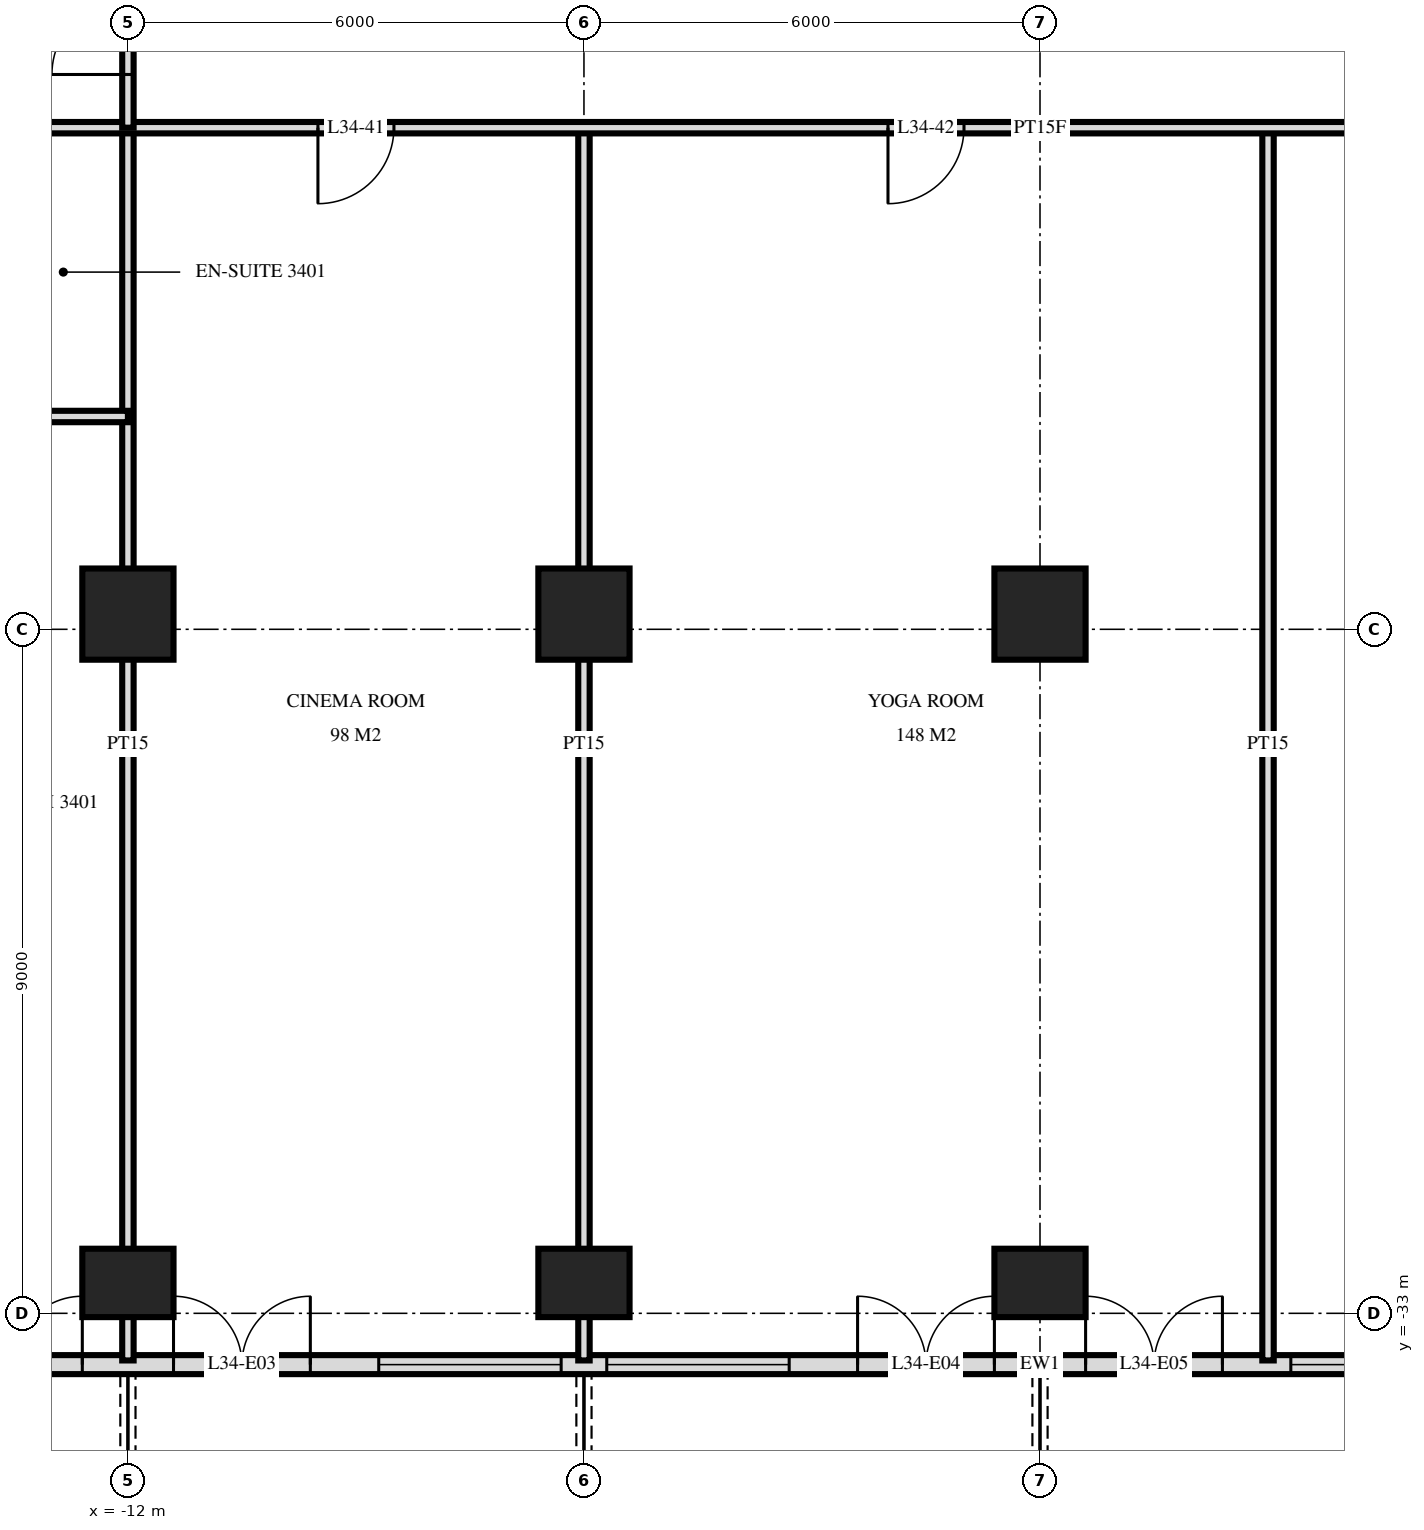
"""IFC4 building model, lengths in metres.
Left out: names, types, materials, properties, quantities, classifications, styles, units other than length and angle.
Written with IfcOpenShell. Run it as: python <this file> out.ifc"""

import sys

from ifc_helpers import new_model, si_unit, direction, frame, frame_2d, origin, origin_2d, place, context, subcontext, project, spatial, rectangle, extrude, element, fill, save


model = new_model("IFC4")
c1 = context("Model", 3, precision=1e-05, world=origin(), true_north=direction((0.0, 1.0)))
c2 = subcontext(c1, "Body", "Model", "MODEL_VIEW")
j1 = project(units=[si_unit("LENGTHUNIT", "METRE"), si_unit("PLANEANGLEUNIT", "RADIAN")], contexts=[c1])
p1 = place(None, origin())
s1 = spatial("IfcSite", under=j1, at=p1, CompositionType="ELEMENT")
p2 = place(p1, origin())
s2 = spatial("IfcBuilding", under=s1, at=p2, CompositionType="ELEMENT")
p3 = place(p2, frame((0.0, 0.0, 134.4)))
s3 = spatial("IfcBuildingStorey", under=s2, at=p3, CompositionType="ELEMENT", Elevation=134.4)
p4 = place(p3, frame((-12.0, -32.6, 0.0), z_axis=(0.0, 0.0, 1.0), x_axis=(1.0, 0.0, 0.0)))
e1 = element("IfcColumn", 1, at=p4, inside=s3, PredefinedType="COLUMN", context=c2, shape_type="SweptSolid", body=[
    extrude(rectangle(XDim=1.2, YDim=0.9, at=origin_2d()), origin(), (0.0, 0.0, 1.0), 3.6),
])
p5 = place(p3, frame((-12.0, -23.8, 0.0), z_axis=(0.0, 0.0, 1.0), x_axis=(1.0, 0.0, 0.0)))
e2 = element("IfcColumn", 2, at=p5, inside=s3, PredefinedType="COLUMN", context=c2, shape_type="SweptSolid", body=[
    extrude(rectangle(XDim=1.2, YDim=1.2, at=origin_2d()), origin(), (0.0, 0.0, 1.0), 3.6),
])
p6 = place(p3, frame((-6.0, -32.6, 0.0), z_axis=(0.0, 0.0, 1.0), x_axis=(1.0, 0.0, 0.0)))
e3 = element("IfcColumn", 3, at=p6, inside=s3, PredefinedType="COLUMN", context=c2, shape_type="SweptSolid", body=[
    extrude(rectangle(XDim=1.2, YDim=0.9, at=origin_2d()), origin(), (0.0, 0.0, 1.0), 3.6),
])
p7 = place(p3, frame((-6.0, -23.8, 0.0), z_axis=(0.0, 0.0, 1.0), x_axis=(1.0, 0.0, 0.0)))
e4 = element("IfcColumn", 4, at=p7, inside=s3, PredefinedType="COLUMN", context=c2, shape_type="SweptSolid", body=[
    extrude(rectangle(XDim=1.2, YDim=1.2, at=origin_2d()), origin(), (0.0, 0.0, 1.0), 3.6),
])
p8 = place(p3, frame((0.0, -32.6, 0.0), z_axis=(0.0, 0.0, 1.0), x_axis=(1.0, 0.0, 0.0)))
e5 = element("IfcColumn", 5, at=p8, inside=s3, PredefinedType="COLUMN", context=c2, shape_type="SweptSolid", body=[
    extrude(rectangle(XDim=1.2, YDim=0.9, at=origin_2d()), origin(), (0.0, 0.0, 1.0), 3.6),
])
p9 = place(p3, frame((0.0, -23.8, 0.0), z_axis=(0.0, 0.0, 1.0), x_axis=(1.0, 0.0, 0.0)))
e6 = element("IfcColumn", 6, at=p9, inside=s3, PredefinedType="COLUMN", context=c2, shape_type="SweptSolid", body=[
    extrude(rectangle(XDim=1.2, YDim=1.2, at=origin_2d()), origin(), (0.0, 0.0, 1.0), 3.6),
])
p10 = place(p3, frame((-23.675, -33.675, 0.0), z_axis=(0.0, 0.0, 1.0), x_axis=(1.0, 0.0, 0.0)))
e7 = element("IfcWall", 7, at=p10, inside=s3, PredefinedType="SOLIDWALL", context=c2, shape_type="SweptSolid", body=[
    extrude(rectangle(XDim=47.351, YDim=0.25, at=frame_2d((23.675, 0.0))), origin(), (0.0, 0.0, 1.0), 3.32),
])
p11 = place(p10, frame((0.575, 0.0, 0.0)))
e8 = element("IfcOpeningElement", 8, at=p11, cuts=e7, PredefinedType="OPENING", context=c2, shape_type="SweptSolid", body=[
    extrude(rectangle(XDim=1.8, YDim=2.4, at=frame_2d((0.9, 1.2))), frame((0.0, 0.135, 0.0), z_axis=(0.0, -1.0, 0.0), x_axis=(1.0, 0.0, 0.0)), (0.0, 0.0, 1.0), 0.27),
])
p12 = place(p10, frame((3.425, 0.0, 0.3)))
e9 = element("IfcOpeningElement", 9, at=p12, cuts=e7, PredefinedType="OPENING", context=c2, shape_type="SweptSolid", body=[
    extrude(rectangle(XDim=1.8, YDim=2.1, at=frame_2d((0.9, 1.05))), frame((0.0, 0.135, 0.0), z_axis=(0.0, -1.0, 0.0), x_axis=(1.0, 0.0, 0.0)), (0.0, 0.0, 1.0), 0.27),
])
p13 = place(p10, frame((5.975, 0.0, 0.3)))
e10 = element("IfcOpeningElement", 10, at=p13, cuts=e7, PredefinedType="OPENING", context=c2, shape_type="SweptSolid", body=[
    extrude(rectangle(XDim=2.4, YDim=2.1, at=frame_2d((1.2, 1.05))), frame((0.0, 0.135, 0.0), z_axis=(0.0, -1.0, 0.0), x_axis=(1.0, 0.0, 0.0)), (0.0, 0.0, 1.0), 0.27),
])
p14 = place(p10, frame((9.275, 0.0, 0.0)))
e11 = element("IfcOpeningElement", 11, at=p14, cuts=e7, PredefinedType="OPENING", context=c2, shape_type="SweptSolid", body=[
    extrude(rectangle(XDim=1.8, YDim=2.4, at=frame_2d((0.9, 1.2))), frame((0.0, 0.135, 0.0), z_axis=(0.0, -1.0, 0.0), x_axis=(1.0, 0.0, 0.0)), (0.0, 0.0, 1.0), 0.27),
])
p15 = place(p10, frame((12.275, 0.0, 0.0)))
e12 = element("IfcOpeningElement", 12, at=p15, cuts=e7, PredefinedType="OPENING", context=c2, shape_type="SweptSolid", body=[
    extrude(rectangle(XDim=1.8, YDim=2.4, at=frame_2d((0.9, 1.2))), frame((0.0, 0.135, 0.0), z_axis=(0.0, -1.0, 0.0), x_axis=(1.0, 0.0, 0.0)), (0.0, 0.0, 1.0), 0.27),
])
p16 = place(p10, frame((14.975, 0.0, 0.3)))
e13 = element("IfcOpeningElement", 13, at=p16, cuts=e7, PredefinedType="OPENING", context=c2, shape_type="SweptSolid", body=[
    extrude(rectangle(XDim=2.4, YDim=2.1, at=frame_2d((1.2, 1.05))), frame((0.0, 0.135, 0.0), z_axis=(0.0, -1.0, 0.0), x_axis=(1.0, 0.0, 0.0)), (0.0, 0.0, 1.0), 0.27),
])
p17 = place(p10, frame((17.975, 0.0, 0.3)))
e14 = element("IfcOpeningElement", 14, at=p17, cuts=e7, PredefinedType="OPENING", context=c2, shape_type="SweptSolid", body=[
    extrude(rectangle(XDim=2.4, YDim=2.1, at=frame_2d((1.2, 1.05))), frame((0.0, 0.135, 0.0), z_axis=(0.0, -1.0, 0.0), x_axis=(1.0, 0.0, 0.0)), (0.0, 0.0, 1.0), 0.27),
])
p18 = place(p10, frame((21.275, 0.0, 0.0)))
e15 = element("IfcOpeningElement", 15, at=p18, cuts=e7, PredefinedType="OPENING", context=c2, shape_type="SweptSolid", body=[
    extrude(rectangle(XDim=1.8, YDim=2.4, at=frame_2d((0.9, 1.2))), frame((0.0, 0.135, 0.0), z_axis=(0.0, -1.0, 0.0), x_axis=(1.0, 0.0, 0.0)), (0.0, 0.0, 1.0), 0.27),
])
p19 = place(p10, frame((24.275, 0.0, 0.0)))
e16 = element("IfcOpeningElement", 16, at=p19, cuts=e7, PredefinedType="OPENING", context=c2, shape_type="SweptSolid", body=[
    extrude(rectangle(XDim=1.8, YDim=2.4, at=frame_2d((0.9, 1.2))), frame((0.0, 0.135, 0.0), z_axis=(0.0, -1.0, 0.0), x_axis=(1.0, 0.0, 0.0)), (0.0, 0.0, 1.0), 0.27),
])
p20 = place(p10, frame((26.975, 0.0, 0.3)))
e17 = element("IfcOpeningElement", 17, at=p20, cuts=e7, PredefinedType="OPENING", context=c2, shape_type="SweptSolid", body=[
    extrude(rectangle(XDim=2.4, YDim=2.1, at=frame_2d((1.2, 1.05))), frame((0.0, 0.135, 0.0), z_axis=(0.0, -1.0, 0.0), x_axis=(1.0, 0.0, 0.0)), (0.0, 0.0, 1.0), 0.27),
])
p21 = place(p10, frame((30.275, 0.0, 0.0)))
e18 = element("IfcOpeningElement", 18, at=p21, cuts=e7, PredefinedType="OPENING", context=c2, shape_type="SweptSolid", body=[
    extrude(rectangle(XDim=1.8, YDim=2.4, at=frame_2d((0.9, 1.2))), frame((0.0, 0.135, 0.0), z_axis=(0.0, -1.0, 0.0), x_axis=(1.0, 0.0, 0.0)), (0.0, 0.0, 1.0), 0.27),
])
p22 = place(p10, frame((32.975, 0.0, 0.3)))
e19 = element("IfcOpeningElement", 19, at=p22, cuts=e7, PredefinedType="OPENING", context=c2, shape_type="SweptSolid", body=[
    extrude(rectangle(XDim=2.4, YDim=2.1, at=frame_2d((1.2, 1.05))), frame((0.0, 0.135, 0.0), z_axis=(0.0, -1.0, 0.0), x_axis=(1.0, 0.0, 0.0)), (0.0, 0.0, 1.0), 0.27),
])
p23 = place(p10, frame((36.275, 0.0, 0.0)))
e20 = element("IfcOpeningElement", 20, at=p23, cuts=e7, PredefinedType="OPENING", context=c2, shape_type="SweptSolid", body=[
    extrude(rectangle(XDim=1.8, YDim=2.4, at=frame_2d((0.9, 1.2))), frame((0.0, 0.135, 0.0), z_axis=(0.0, -1.0, 0.0), x_axis=(1.0, 0.0, 0.0)), (0.0, 0.0, 1.0), 0.27),
])
p24 = place(p10, frame((38.975, 0.0, 0.3)))
e21 = element("IfcOpeningElement", 21, at=p24, cuts=e7, PredefinedType="OPENING", context=c2, shape_type="SweptSolid", body=[
    extrude(rectangle(XDim=2.4, YDim=2.1, at=frame_2d((1.2, 1.05))), frame((0.0, 0.135, 0.0), z_axis=(0.0, -1.0, 0.0), x_axis=(1.0, 0.0, 0.0)), (0.0, 0.0, 1.0), 0.27),
])
p25 = place(p10, frame((42.275, 0.0, 0.0)))
e22 = element("IfcOpeningElement", 22, at=p25, cuts=e7, PredefinedType="OPENING", context=c2, shape_type="SweptSolid", body=[
    extrude(rectangle(XDim=1.8, YDim=2.4, at=frame_2d((0.9, 1.2))), frame((0.0, 0.135, 0.0), z_axis=(0.0, -1.0, 0.0), x_axis=(1.0, 0.0, 0.0)), (0.0, 0.0, 1.0), 0.27),
])
p26 = place(p10, frame((45.125, 0.0, 0.3)))
e23 = element("IfcOpeningElement", 23, at=p26, cuts=e7, PredefinedType="OPENING", context=c2, shape_type="SweptSolid", body=[
    extrude(rectangle(XDim=1.8, YDim=2.1, at=frame_2d((0.9, 1.05))), frame((0.0, 0.135, 0.0), z_axis=(0.0, -1.0, 0.0), x_axis=(1.0, 0.0, 0.0)), (0.0, 0.0, 1.0), 0.27),
])
for number, where, z_axis, x_axis in (
    (24, (3.0, -33.62, 0.0), (0.0, 0.0, 1.0), (0.0, 1.0, 0.0)),
    (25, (-6.0, -33.62, 0.0), (0.0, 0.0, 1.0), (0.0, 1.0, 0.0)),
):
    element("IfcWall", number, at=place(p3, frame(where, z_axis=z_axis, x_axis=x_axis)), inside=s3, PredefinedType="PARTITIONING", context=c2, shape_type="SweptSolid", body=[
        extrude(rectangle(XDim=16.22, YDim=0.15, at=frame_2d((8.11, 0.0))), origin(), (0.0, 0.0, 1.0), 3.32),
    ])
p27 = place(p3, frame((-12.0, -17.4, 0.0), z_axis=(0.0, 0.0, 1.0), x_axis=(0.0, 1.0, 0.0)))
e26 = element("IfcWall", 26, at=p27, inside=s3, PredefinedType="PARTITIONING", context=c2, shape_type="SweptSolid", body=[
    extrude(rectangle(XDim=2.35, YDim=0.15, at=frame_2d((1.175, 0.0))), origin(), (0.0, 0.0, 1.0), 3.32),
])
p28 = place(p27, frame((0.7, 0.0, 0.0)))
e27 = element("IfcOpeningElement", 27, at=p28, cuts=e26, PredefinedType="OPENING", context=c2, shape_type="SweptSolid", body=[
    extrude(rectangle(XDim=1.0, YDim=2.1, at=frame_2d((0.5, 1.05))), frame((0.0, 0.085, 0.0), z_axis=(0.0, -1.0, 0.0), x_axis=(1.0, 0.0, 0.0)), (0.0, 0.0, 1.0), 0.17),
])
p29 = place(p3, frame((-12.0, -33.62, 0.0), z_axis=(0.0, 0.0, 1.0), x_axis=(0.0, 1.0, 0.0)))
e28 = element("IfcWall", 28, at=p29, inside=s3, PredefinedType="PARTITIONING", context=c2, shape_type="SweptSolid", body=[
    extrude(rectangle(XDim=16.22, YDim=0.15, at=frame_2d((8.11, 0.0))), origin(), (0.0, 0.0, 1.0), 3.32),
])
p30 = place(p3, frame((-13.7, -21.2, 0.0), z_axis=(0.0, 0.0, 1.0), x_axis=(1.0, 0.0, 0.0)))
e29 = element("IfcWall", 29, at=p30, inside=s3, PredefinedType="PARTITIONING", context=c2, shape_type="SweptSolid", body=[
    extrude(rectangle(XDim=1.7, YDim=0.15, at=frame_2d((0.85, 0.0))), origin(), (0.0, 0.0, 1.0), 3.32),
])
p31 = place(p3, frame((-28.02, -17.4, 0.0), z_axis=(0.0, 0.0, 1.0), x_axis=(1.0, 0.0, 0.0)))
e30 = element("IfcWall", 30, at=p31, inside=s3, PredefinedType="PARTITIONING", context=c2, shape_type="SweptSolid", body=[
    extrude(rectangle(XDim=56.04, YDim=0.15, at=frame_2d((28.02, 0.0))), origin(), (0.0, 0.0, 1.0), 3.32),
])
p32 = place(p31, frame((13.17, 0.0, 0.0)))
e31 = element("IfcOpeningElement", 31, at=p32, cuts=e30, PredefinedType="OPENING", context=c2, shape_type="SweptSolid", body=[
    extrude(rectangle(XDim=1.0, YDim=2.1, at=frame_2d((0.5, 1.05))), frame((0.0, 0.085, 0.0), z_axis=(0.0, -1.0, 0.0), x_axis=(1.0, 0.0, 0.0)), (0.0, 0.0, 1.0), 0.17),
])
p33 = place(p31, frame((11.87, 0.0, 0.0)))
e32 = element("IfcOpeningElement", 32, at=p33, cuts=e30, PredefinedType="OPENING", context=c2, shape_type="SweptSolid", body=[
    extrude(rectangle(XDim=1.0, YDim=2.1, at=frame_2d((0.5, 1.05))), frame((0.0, 0.085, 0.0), z_axis=(0.0, -1.0, 0.0), x_axis=(1.0, 0.0, 0.0)), (0.0, 0.0, 1.0), 0.17),
])
p34 = place(p31, frame((2.32, 0.0, 0.0)))
e33 = element("IfcOpeningElement", 33, at=p34, cuts=e30, PredefinedType="OPENING", context=c2, shape_type="SweptSolid", body=[
    extrude(rectangle(XDim=1.0, YDim=2.1, at=frame_2d((0.5, 1.05))), frame((0.0, 0.085, 0.0), z_axis=(0.0, -1.0, 0.0), x_axis=(1.0, 0.0, 0.0)), (0.0, 0.0, 1.0), 0.17),
])
p35 = place(p31, frame((40.17, 0.0, 0.0)))
e34 = element("IfcOpeningElement", 34, at=p35, cuts=e30, PredefinedType="OPENING", context=c2, shape_type="SweptSolid", body=[
    extrude(rectangle(XDim=1.0, YDim=2.1, at=frame_2d((0.5, 1.05))), frame((0.0, 0.085, 0.0), z_axis=(0.0, -1.0, 0.0), x_axis=(1.0, 0.0, 0.0)), (0.0, 0.0, 1.0), 0.17),
])
p36 = place(p31, frame((51.22, 0.0, 0.0)))
e35 = element("IfcOpeningElement", 35, at=p36, cuts=e30, PredefinedType="OPENING", context=c2, shape_type="SweptSolid", body=[
    extrude(rectangle(XDim=1.0, YDim=2.1, at=frame_2d((0.5, 1.05))), frame((0.0, 0.085, 0.0), z_axis=(0.0, -1.0, 0.0), x_axis=(1.0, 0.0, 0.0)), (0.0, 0.0, 1.0), 0.17),
])
p37 = place(p31, frame((18.52, 0.0, 0.0)))
e36 = element("IfcOpeningElement", 36, at=p37, cuts=e30, PredefinedType="OPENING", context=c2, shape_type="SweptSolid", body=[
    extrude(rectangle(XDim=1.0, YDim=2.1, at=frame_2d((0.5, 1.05))), frame((0.0, 0.085, 0.0), z_axis=(0.0, -1.0, 0.0), x_axis=(1.0, 0.0, 0.0)), (0.0, 0.0, 1.0), 0.17),
])
p38 = place(p31, frame((26.02, 0.0, 0.0)))
e37 = element("IfcOpeningElement", 37, at=p38, cuts=e30, PredefinedType="OPENING", context=c2, shape_type="SweptSolid", body=[
    extrude(rectangle(XDim=1.0, YDim=2.1, at=frame_2d((0.5, 1.05))), frame((0.0, 0.085, 0.0), z_axis=(0.0, -1.0, 0.0), x_axis=(1.0, 0.0, 0.0)), (0.0, 0.0, 1.0), 0.17),
])
p39 = place(p31, frame((35.02, 0.0, 0.0)))
e38 = element("IfcOpeningElement", 38, at=p39, cuts=e30, PredefinedType="OPENING", context=c2, shape_type="SweptSolid", body=[
    extrude(rectangle(XDim=1.0, YDim=2.1, at=frame_2d((0.5, 1.05))), frame((0.0, 0.085, 0.0), z_axis=(0.0, -1.0, 0.0), x_axis=(1.0, 0.0, 0.0)), (0.0, 0.0, 1.0), 0.17),
])
p40 = place(p14, origin())
e39 = element("IfcDoor", 39, at=p40, inside=s3, OperationType="DOUBLE_DOOR_SINGLE_SWING", PredefinedType="DOOR", context=c2, shape_type="SweptSolid", body=[
    extrude(rectangle(XDim=1.8, YDim=2.4, at=frame_2d((0.9, 1.2))), frame((0.0, 0.025, 0.0), z_axis=(0.0, -1.0, 0.0), x_axis=(1.0, 0.0, 0.0)), (0.0, 0.0, 1.0), 0.05),
])
fill(e11, e39)
p41 = place(p15, origin())
e40 = element("IfcDoor", 40, at=p41, inside=s3, OperationType="DOUBLE_DOOR_SINGLE_SWING", PredefinedType="DOOR", context=c2, shape_type="SweptSolid", body=[
    extrude(rectangle(XDim=1.8, YDim=2.4, at=frame_2d((0.9, 1.2))), frame((0.0, 0.025, 0.0), z_axis=(0.0, -1.0, 0.0), x_axis=(1.0, 0.0, 0.0)), (0.0, 0.0, 1.0), 0.05),
])
fill(e12, e40)
p42 = place(p16, origin())
e41 = element("IfcWindow", 41, at=p42, inside=s3, PartitioningType="SINGLE_PANEL", PredefinedType="WINDOW", context=c2, shape_type="SweptSolid", body=[
    extrude(rectangle(XDim=2.4, YDim=2.1, at=frame_2d((1.2, 1.05))), frame((0.0, 0.03, 0.0), z_axis=(0.0, -1.0, 0.0), x_axis=(1.0, 0.0, 0.0)), (0.0, 0.0, 1.0), 0.06),
])
fill(e13, e41)
p43 = place(p17, origin())
e42 = element("IfcWindow", 42, at=p43, inside=s3, PartitioningType="SINGLE_PANEL", PredefinedType="WINDOW", context=c2, shape_type="SweptSolid", body=[
    extrude(rectangle(XDim=2.4, YDim=2.1, at=frame_2d((1.2, 1.05))), frame((0.0, 0.03, 0.0), z_axis=(0.0, -1.0, 0.0), x_axis=(1.0, 0.0, 0.0)), (0.0, 0.0, 1.0), 0.06),
])
fill(e14, e42)
p44 = place(p18, origin())
e43 = element("IfcDoor", 43, at=p44, inside=s3, OperationType="DOUBLE_DOOR_SINGLE_SWING", PredefinedType="DOOR", context=c2, shape_type="SweptSolid", body=[
    extrude(rectangle(XDim=1.8, YDim=2.4, at=frame_2d((0.9, 1.2))), frame((0.0, 0.025, 0.0), z_axis=(0.0, -1.0, 0.0), x_axis=(1.0, 0.0, 0.0)), (0.0, 0.0, 1.0), 0.05),
])
fill(e15, e43)
p45 = place(p19, origin())
e44 = element("IfcDoor", 44, at=p45, inside=s3, OperationType="DOUBLE_DOOR_SINGLE_SWING", PredefinedType="DOOR", context=c2, shape_type="SweptSolid", body=[
    extrude(rectangle(XDim=1.8, YDim=2.4, at=frame_2d((0.9, 1.2))), frame((0.0, 0.025, 0.0), z_axis=(0.0, -1.0, 0.0), x_axis=(1.0, 0.0, 0.0)), (0.0, 0.0, 1.0), 0.05),
])
fill(e16, e44)
p46 = place(p20, origin())
e45 = element("IfcWindow", 45, at=p46, inside=s3, PartitioningType="SINGLE_PANEL", PredefinedType="WINDOW", context=c2, shape_type="SweptSolid", body=[
    extrude(rectangle(XDim=2.4, YDim=2.1, at=frame_2d((1.2, 1.05))), frame((0.0, 0.03, 0.0), z_axis=(0.0, -1.0, 0.0), x_axis=(1.0, 0.0, 0.0)), (0.0, 0.0, 1.0), 0.06),
])
fill(e17, e45)
p47 = place(p28, origin())
e46 = element("IfcDoor", 46, at=p47, inside=s3, OperationType="SINGLE_SWING_RIGHT", PredefinedType="DOOR", context=c2, shape_type="SweptSolid", body=[
    extrude(rectangle(XDim=1.0, YDim=2.1, at=frame_2d((0.5, 1.05))), frame((0.0, 0.025, 0.0), z_axis=(0.0, -1.0, 0.0), x_axis=(1.0, 0.0, 0.0)), (0.0, 0.0, 1.0), 0.05),
])
fill(e27, e46)
p48 = place(p37, frame((0.5, 0.0, 0.0), z_axis=(0.0, 0.0, 1.0), x_axis=(-1.0, 0.0, 0.0)))
e47 = element("IfcDoor", 47, at=p48, inside=s3, OperationType="SINGLE_SWING_LEFT", PredefinedType="DOOR", context=c2, shape_type="SweptSolid", body=[
    extrude(rectangle(XDim=1.0, YDim=2.1, at=frame_2d((0.0, 1.05))), frame((0.0, -0.025, 0.0), z_axis=(0.0, 1.0, 0.0), x_axis=(-1.0, 0.0, 0.0)), (0.0, 0.0, 1.0), 0.05),
])
fill(e36, e47)
p49 = place(p38, frame((0.5, 0.0, 0.0), z_axis=(0.0, 0.0, 1.0), x_axis=(-1.0, 0.0, 0.0)))
e48 = element("IfcDoor", 48, at=p49, inside=s3, OperationType="SINGLE_SWING_LEFT", PredefinedType="DOOR", context=c2, shape_type="SweptSolid", body=[
    extrude(rectangle(XDim=1.0, YDim=2.1, at=frame_2d((0.0, 1.05))), frame((0.0, -0.025, 0.0), z_axis=(0.0, 1.0, 0.0), x_axis=(-1.0, 0.0, 0.0)), (0.0, 0.0, 1.0), 0.05),
])
fill(e37, e48)
save(model, sys.argv[1])
